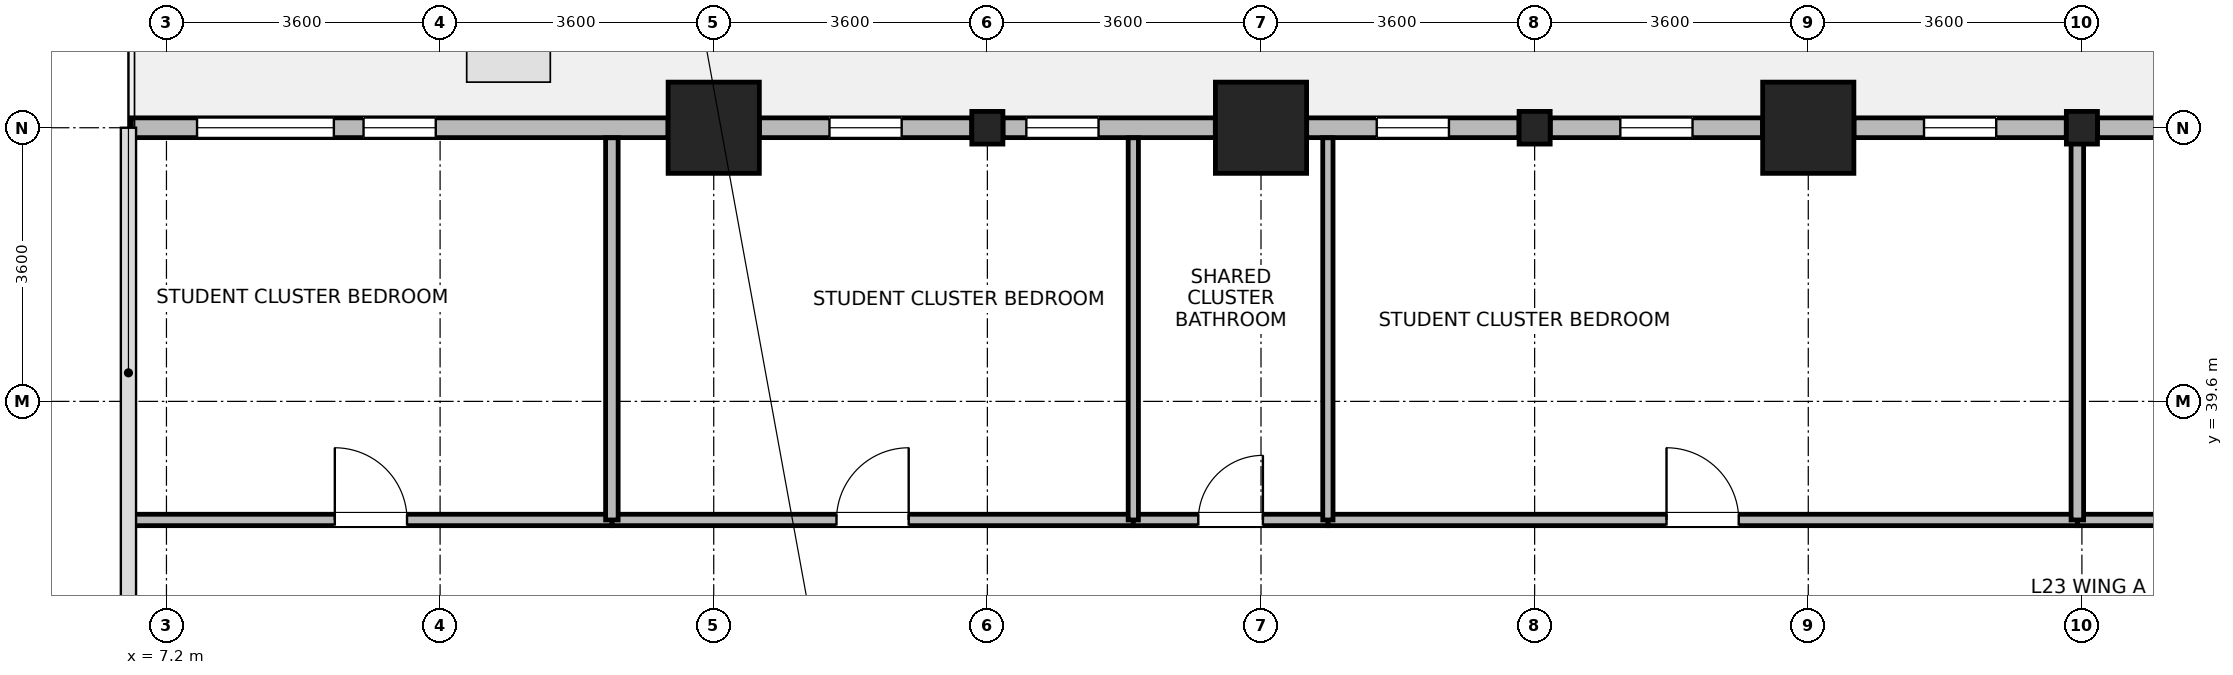
"""IFC4 building model, lengths in metres.
Left out: names, types, materials, properties, quantities, classifications, styles, units other than length and angle.
Written with IfcOpenShell. Run it as: python <this file> out.ifc"""

import sys

from ifc_helpers import new_model, si_unit, direction, frame, frame_2d, origin, origin_2d, place, context, subcontext, project, spatial, rectangle, i_section, extrude, source, transform, mapped, element, fill, save


model = new_model("IFC4")
c1 = context("Model", 3, precision=1e-05, world=origin(), true_north=direction((0.0, 1.0)))
c2 = subcontext(c1, "Body", "Model", "MODEL_VIEW")
j1 = project(units=[si_unit("LENGTHUNIT", "METRE"), si_unit("PLANEANGLEUNIT", "RADIAN")], contexts=[c1])
p1 = place(None, origin())
s1 = spatial("IfcSite", under=j1, at=p1, CompositionType="ELEMENT")
p2 = place(p1, origin())
s2 = spatial("IfcBuilding", under=s1, at=p2, CompositionType="ELEMENT")
p3 = place(p2, frame((0.0, 0.0, 93.4)))
s3 = spatial("IfcBuildingStorey", under=s2, at=p3, CompositionType="ELEMENT", Elevation=93.4)
m1 = source(origin(), c2, "Body", "SweptSolid", [
    extrude(rectangle(XDim=1.2, YDim=1.2, at=origin_2d()), origin(), (0.0, 0.0, 1.0), 3.7),
])
for number, where, z_axis, x_axis in (
    (1, (14.4, 43.2, 0.0), (0.0, 0.0, 1.0), (1.0, 0.0, 0.0)),
    (2, (21.6, 43.2, 0.0), (0.0, 0.0, 1.0), (1.0, 0.0, 0.0)),
    (3, (28.8, 43.2, 0.0), (0.0, 0.0, 1.0), (1.0, 0.0, 0.0)),
):
    element("IfcColumn", number, at=place(p3, frame(where, z_axis=z_axis, x_axis=x_axis)), inside=s3, PredefinedType="COLUMN", context=c2, shape_type="MappedRepresentation", body=[
        mapped(m1, transform((0.0, 0.0, 0.0), x_axis=(1.0, 0.0, 0.0), y_axis=(0.0, 1.0, 0.0), z_axis=(0.0, 0.0, 1.0), scale=1.0)),
    ])
m2 = source(origin(), c2, "Body", "SweptSolid", [
    extrude(i_section(OverallWidth=0.409, OverallDepth=0.43, WebThickness=0.024, FlangeThickness=0.033, FilletRadius=0.015, at=origin_2d()), origin(), (0.0, 0.0, 1.0), 3.7),
])
for number, where, z_axis, x_axis in (
    (4, (18.0, 43.2, 0.0), (0.0, 0.0, 1.0), (1.0, 0.0, 0.0)),
    (5, (25.2, 43.2, 0.0), (0.0, 0.0, 1.0), (1.0, 0.0, 0.0)),
    (6, (32.4, 43.2, 0.0), (0.0, 0.0, 1.0), (1.0, 0.0, 0.0)),
):
    element("IfcColumn", number, at=place(p3, frame(where, z_axis=z_axis, x_axis=x_axis)), inside=s3, PredefinedType="COLUMN", context=c2, shape_type="MappedRepresentation", body=[
        mapped(m2, transform((0.0, 0.0, 0.0), x_axis=(1.0, 0.0, 0.0), y_axis=(0.0, 1.0, 0.0), z_axis=(0.0, 0.0, 1.0), scale=1.0)),
    ])
p4 = place(p3, frame((32.605, 43.2, 0.0), z_axis=(0.0, 0.0, 1.0), x_axis=(1.0, 0.0, 0.0)))
e7 = element("IfcWall", 7, at=p4, inside=s3, PredefinedType="STANDARD", context=c2, shape_type="SweptSolid", body=[
    extrude(rectangle(XDim=2.793, YDim=0.26, at=frame_2d((1.397, 0.0))), origin(), (0.0, 0.0, 1.0), 2.93),
])
p5 = place(p4, frame((0.922, 0.0, 0.85)))
e8 = element("IfcOpeningElement", 8, at=p5, cuts=e7, PredefinedType="OPENING", context=c2, shape_type="SweptSolid", body=[
    extrude(rectangle(XDim=0.95, YDim=1.75, at=frame_2d((0.475, 0.875))), frame((0.0, 0.14, 0.0), z_axis=(0.0, -1.0, 0.0), x_axis=(1.0, 0.0, 0.0)), (0.0, 0.0, 1.0), 0.28),
])
p6 = place(p3, frame((29.401, 43.2, 0.0), z_axis=(0.0, 0.0, 1.0), x_axis=(1.0, 0.0, 0.0)))
e9 = element("IfcWall", 9, at=p6, inside=s3, PredefinedType="STANDARD", context=c2, shape_type="SweptSolid", body=[
    extrude(rectangle(XDim=2.794, YDim=0.26, at=frame_2d((1.397, 0.0))), origin(), (0.0, 0.0, 1.0), 2.93),
])
p7 = place(p6, frame((0.922, 0.0, 0.85)))
e10 = element("IfcOpeningElement", 10, at=p7, cuts=e9, PredefinedType="OPENING", context=c2, shape_type="SweptSolid", body=[
    extrude(rectangle(XDim=0.95, YDim=1.75, at=frame_2d((0.475, 0.875))), frame((0.0, 0.14, 0.0), z_axis=(0.0, -1.0, 0.0), x_axis=(1.0, 0.0, 0.0)), (0.0, 0.0, 1.0), 0.28),
])
p8 = place(p3, frame((25.406, 43.2, 0.0), z_axis=(0.0, 0.0, 1.0), x_axis=(1.0, 0.0, 0.0)))
e11 = element("IfcWall", 11, at=p8, inside=s3, PredefinedType="STANDARD", context=c2, shape_type="SweptSolid", body=[
    extrude(rectangle(XDim=2.793, YDim=0.26, at=frame_2d((1.397, 0.0))), origin(), (0.0, 0.0, 1.0), 2.93),
])
p9 = place(p8, frame((0.922, 0.0, 0.85)))
e12 = element("IfcOpeningElement", 12, at=p9, cuts=e11, PredefinedType="OPENING", context=c2, shape_type="SweptSolid", body=[
    extrude(rectangle(XDim=0.95, YDim=1.75, at=frame_2d((0.475, 0.875))), frame((0.0, 0.14, 0.0), z_axis=(0.0, -1.0, 0.0), x_axis=(1.0, 0.0, 0.0)), (0.0, 0.0, 1.0), 0.28),
])
p10 = place(p3, frame((22.201, 43.2, 0.0), z_axis=(0.0, 0.0, 1.0), x_axis=(1.0, 0.0, 0.0)))
e13 = element("IfcWall", 13, at=p10, inside=s3, PredefinedType="STANDARD", context=c2, shape_type="SweptSolid", body=[
    extrude(rectangle(XDim=2.793, YDim=0.26, at=frame_2d((1.397, 0.0))), origin(), (0.0, 0.0, 1.0), 2.93),
])
p11 = place(p10, frame((0.922, 0.0, 0.85)))
e14 = element("IfcOpeningElement", 14, at=p11, cuts=e13, PredefinedType="OPENING", context=c2, shape_type="SweptSolid", body=[
    extrude(rectangle(XDim=0.95, YDim=1.75, at=frame_2d((0.475, 0.875))), frame((0.0, 0.14, 0.0), z_axis=(0.0, -1.0, 0.0), x_axis=(1.0, 0.0, 0.0)), (0.0, 0.0, 1.0), 0.28),
])
p12 = place(p3, frame((18.206, 43.2, 0.0), z_axis=(0.0, 0.0, 1.0), x_axis=(1.0, 0.0, 0.0)))
e15 = element("IfcWall", 15, at=p12, inside=s3, PredefinedType="STANDARD", context=c2, shape_type="SweptSolid", body=[
    extrude(rectangle(XDim=2.793, YDim=0.26, at=frame_2d((1.397, 0.0))), origin(), (0.0, 0.0, 1.0), 2.93),
])
p13 = place(p12, frame((0.307, 0.0, 0.85)))
e16 = element("IfcOpeningElement", 16, at=p13, cuts=e15, PredefinedType="OPENING", context=c2, shape_type="SweptSolid", body=[
    extrude(rectangle(XDim=0.95, YDim=1.75, at=frame_2d((0.475, 0.875))), frame((0.0, 0.14, 0.0), z_axis=(0.0, -1.0, 0.0), x_axis=(1.0, 0.0, 0.0)), (0.0, 0.0, 1.0), 0.28),
])
p14 = place(p3, frame((15.001, 43.2, 0.0), z_axis=(0.0, 0.0, 1.0), x_axis=(1.0, 0.0, 0.0)))
e17 = element("IfcWall", 17, at=p14, inside=s3, PredefinedType="STANDARD", context=c2, shape_type="SweptSolid", body=[
    extrude(rectangle(XDim=2.793, YDim=0.26, at=frame_2d((1.397, 0.0))), origin(), (0.0, 0.0, 1.0), 2.93),
])
p15 = place(p14, frame((0.922, 0.0, 0.85)))
e18 = element("IfcOpeningElement", 18, at=p15, cuts=e17, PredefinedType="OPENING", context=c2, shape_type="SweptSolid", body=[
    extrude(rectangle(XDim=0.95, YDim=1.75, at=frame_2d((0.475, 0.875))), frame((0.0, 0.14, 0.0), z_axis=(0.0, -1.0, 0.0), x_axis=(1.0, 0.0, 0.0)), (0.0, 0.0, 1.0), 0.28),
])
p16 = place(p3, frame((6.737, 43.2, 0.0), z_axis=(0.0, 0.0, 1.0), x_axis=(1.0, 0.0, 0.0)))
e19 = element("IfcWall", 19, at=p16, inside=s3, PredefinedType="STANDARD", context=c2, shape_type="SweptSolid", body=[
    extrude(rectangle(XDim=7.062, YDim=0.26, at=frame_2d((3.531, 0.0))), origin(), (0.0, 0.0, 1.0), 3.43),
])
p17 = place(p16, frame((0.865, 0.0, 0.85)))
e20 = element("IfcOpeningElement", 20, at=p17, cuts=e19, PredefinedType="OPENING", context=c2, shape_type="SweptSolid", body=[
    extrude(rectangle(XDim=1.8, YDim=1.85, at=frame_2d((0.9, 0.925))), frame((0.0, 0.14, 0.0), z_axis=(0.0, -1.0, 0.0), x_axis=(1.0, 0.0, 0.0)), (0.0, 0.0, 1.0), 0.28),
])
p18 = place(p16, frame((3.056, 0.0, 0.85)))
e21 = element("IfcOpeningElement", 21, at=p18, cuts=e19, PredefinedType="OPENING", context=c2, shape_type="SweptSolid", body=[
    extrude(rectangle(XDim=0.95, YDim=1.75, at=frame_2d((0.475, 0.875))), frame((0.0, 0.14, 0.0), z_axis=(0.0, -1.0, 0.0), x_axis=(1.0, 0.0, 0.0)), (0.0, 0.0, 1.0), 0.28),
])
p19 = place(p3, frame((32.34, 38.04, 0.0), z_axis=(0.0, 0.0, 1.0), x_axis=(1.0, 0.0, 0.0)))
e22 = element("IfcWall", 22, at=p19, inside=s3, PredefinedType="PARTITIONING", context=c2, shape_type="SweptSolid", body=[
    extrude(rectangle(XDim=14.4, YDim=0.15, at=frame_2d((7.2, 0.0))), origin(), (0.0, 0.0, 1.0), 3.43),
])
p20 = place(p19, frame((6.75, 0.0, 0.0)))
e23 = element("IfcOpeningElement", 23, at=p20, cuts=e22, PredefinedType="OPENING", context=c2, shape_type="SweptSolid", body=[
    extrude(rectangle(XDim=0.9, YDim=2.08, at=frame_2d((0.45, 1.04))), frame((0.0, 0.085, 0.0), z_axis=(0.0, -1.0, 0.0), x_axis=(1.0, 0.0, 0.0)), (0.0, 0.0, 1.0), 0.17),
])
p21 = place(p3, frame((22.48, 38.04, 0.0), z_axis=(0.0, 0.0, 1.0), x_axis=(1.0, 0.0, 0.0)))
e24 = element("IfcWall", 24, at=p21, inside=s3, PredefinedType="PARTITIONING", context=c2, shape_type="SweptSolid", body=[
    extrude(rectangle(XDim=9.86, YDim=0.15, at=frame_2d((4.93, 0.0))), origin(), (0.0, 0.0, 1.0), 3.43),
])
p22 = place(p21, frame((4.455, 0.0, 0.0)))
e25 = element("IfcOpeningElement", 25, at=p22, cuts=e24, PredefinedType="OPENING", context=c2, shape_type="SweptSolid", body=[
    extrude(rectangle(XDim=0.95, YDim=2.1, at=frame_2d((0.475, 1.05))), frame((0.0, 0.085, 0.0), z_axis=(0.0, -1.0, 0.0), x_axis=(1.0, 0.0, 0.0)), (0.0, 0.0, 1.0), 0.17),
])
p23 = place(p3, frame((13.06, 38.04, 0.0), z_axis=(0.0, 0.0, 1.0), x_axis=(1.0, 0.0, 0.0)))
e26 = element("IfcWall", 26, at=p23, inside=s3, PredefinedType="PARTITIONING", context=c2, shape_type="SweptSolid", body=[
    extrude(rectangle(XDim=6.86, YDim=0.15, at=frame_2d((3.43, 0.0))), origin(), (0.0, 0.0, 1.0), 3.43),
])
p24 = place(p23, frame((2.955, 0.0, 0.0)))
e27 = element("IfcOpeningElement", 27, at=p24, cuts=e26, PredefinedType="OPENING", context=c2, shape_type="SweptSolid", body=[
    extrude(rectangle(XDim=0.95, YDim=2.1, at=frame_2d((0.475, 1.05))), frame((0.0, 0.085, 0.0), z_axis=(0.0, -1.0, 0.0), x_axis=(1.0, 0.0, 0.0)), (0.0, 0.0, 1.0), 0.17),
])
p25 = place(p3, frame((6.72, 38.04, 0.0), z_axis=(0.0, 0.0, 1.0), x_axis=(1.0, 0.0, 0.0)))
e28 = element("IfcWall", 28, at=p25, inside=s3, PredefinedType="PARTITIONING", context=c2, shape_type="SweptSolid", body=[
    extrude(rectangle(XDim=6.34, YDim=0.15, at=frame_2d((3.17, 0.0))), origin(), (0.0, 0.0, 1.0), 3.43),
])
p26 = place(p25, frame((2.695, 0.0, 0.0)))
e29 = element("IfcOpeningElement", 29, at=p26, cuts=e28, PredefinedType="OPENING", context=c2, shape_type="SweptSolid", body=[
    extrude(rectangle(XDim=0.95, YDim=2.1, at=frame_2d((0.475, 1.05))), frame((0.0, 0.085, 0.0), z_axis=(0.0, -1.0, 0.0), x_axis=(1.0, 0.0, 0.0)), (0.0, 0.0, 1.0), 0.17),
])
p27 = place(p3, frame((19.92, 38.04, 0.0), z_axis=(0.0, 0.0, 1.0), x_axis=(1.0, 0.0, 0.0)))
e30 = element("IfcWall", 30, at=p27, inside=s3, PredefinedType="PARTITIONING", context=c2, shape_type="SweptSolid", body=[
    extrude(rectangle(XDim=2.56, YDim=0.15, at=frame_2d((1.28, 0.0))), origin(), (0.0, 0.0, 1.0), 3.43),
])
p28 = place(p27, frame((0.855, 0.0, 0.0)))
e31 = element("IfcOpeningElement", 31, at=p28, cuts=e30, PredefinedType="OPENING", context=c2, shape_type="SweptSolid", body=[
    extrude(rectangle(XDim=0.85, YDim=2.04, at=frame_2d((0.425, 1.02))), frame((0.0, 0.085, 0.0), z_axis=(0.0, -1.0, 0.0), x_axis=(1.0, 0.0, 0.0)), (0.0, 0.0, 1.0), 0.17),
])
p29 = place(p3, frame((13.06, 38.04, 0.0), z_axis=(0.0, 0.0, 1.0), x_axis=(0.0, 1.0, 0.0)))
e32 = element("IfcWall", 32, at=p29, inside=s3, PredefinedType="PARTITIONING", context=c2, shape_type="SweptSolid", body=[
    extrude(rectangle(XDim=5.028, YDim=0.165, at=frame_2d((2.514, 0.0))), origin(), (0.0, 0.0, 1.0), 3.43),
])
for number, where, z_axis, x_axis in (
    (33, (19.92, 38.04, 0.0), (0.0, 0.0, 1.0), (0.0, 1.0, 0.0)),
    (34, (22.48, 38.04, 0.0), (0.0, 0.0, 1.0), (0.0, 1.0, 0.0)),
):
    element("IfcWall", number, at=place(p3, frame(where, z_axis=z_axis, x_axis=x_axis)), inside=s3, PredefinedType="PARTITIONING", context=c2, shape_type="SweptSolid", body=[
        extrude(rectangle(XDim=5.028, YDim=0.135, at=frame_2d((2.514, 0.0))), origin(), (0.0, 0.0, 1.0), 3.43),
    ])
p30 = place(p3, frame((32.34, 38.04, 0.0), z_axis=(0.0, 0.0, 1.0), x_axis=(0.0, 1.0, 0.0)))
e35 = element("IfcWall", 35, at=p30, inside=s3, PredefinedType="PARTITIONING", context=c2, shape_type="SweptSolid", body=[
    extrude(rectangle(XDim=5.028, YDim=0.165, at=frame_2d((2.514, 0.0))), origin(), (0.0, 0.0, 1.0), 3.07),
])
p31 = place(p7, origin())
e36 = element("IfcWindow", 36, at=p31, inside=s3, PartitioningType="SINGLE_PANEL", PredefinedType="WINDOW", context=c2, shape_type="SweptSolid", body=[
    extrude(rectangle(XDim=0.95, YDim=1.75, at=frame_2d((0.475, 0.875))), frame((0.0, 0.03, 0.0), z_axis=(0.0, -1.0, 0.0), x_axis=(1.0, 0.0, 0.0)), (0.0, 0.0, 1.0), 0.06),
])
fill(e10, e36)
p32 = place(p9, origin())
e37 = element("IfcWindow", 37, at=p32, inside=s3, PartitioningType="SINGLE_PANEL", PredefinedType="WINDOW", context=c2, shape_type="SweptSolid", body=[
    extrude(rectangle(XDim=0.95, YDim=1.75, at=frame_2d((0.475, 0.875))), frame((0.0, 0.03, 0.0), z_axis=(0.0, -1.0, 0.0), x_axis=(1.0, 0.0, 0.0)), (0.0, 0.0, 1.0), 0.06),
])
fill(e12, e37)
p33 = place(p11, origin())
e38 = element("IfcWindow", 38, at=p33, inside=s3, PartitioningType="SINGLE_PANEL", PredefinedType="WINDOW", context=c2, shape_type="SweptSolid", body=[
    extrude(rectangle(XDim=0.95, YDim=1.75, at=frame_2d((0.475, 0.875))), frame((0.0, 0.03, 0.0), z_axis=(0.0, -1.0, 0.0), x_axis=(1.0, 0.0, 0.0)), (0.0, 0.0, 1.0), 0.06),
])
fill(e14, e38)
p34 = place(p13, origin())
e39 = element("IfcWindow", 39, at=p34, inside=s3, PartitioningType="SINGLE_PANEL", PredefinedType="WINDOW", context=c2, shape_type="SweptSolid", body=[
    extrude(rectangle(XDim=0.95, YDim=1.75, at=frame_2d((0.475, 0.875))), frame((0.0, 0.03, 0.0), z_axis=(0.0, -1.0, 0.0), x_axis=(1.0, 0.0, 0.0)), (0.0, 0.0, 1.0), 0.06),
])
fill(e16, e39)
p35 = place(p15, origin())
e40 = element("IfcWindow", 40, at=p35, inside=s3, PartitioningType="SINGLE_PANEL", PredefinedType="WINDOW", context=c2, shape_type="SweptSolid", body=[
    extrude(rectangle(XDim=0.95, YDim=1.75, at=frame_2d((0.475, 0.875))), frame((0.0, 0.03, 0.0), z_axis=(0.0, -1.0, 0.0), x_axis=(1.0, 0.0, 0.0)), (0.0, 0.0, 1.0), 0.06),
])
fill(e18, e40)
p36 = place(p17, origin())
e41 = element("IfcWindow", 41, at=p36, inside=s3, PartitioningType="SINGLE_PANEL", PredefinedType="WINDOW", context=c2, shape_type="SweptSolid", body=[
    extrude(rectangle(XDim=1.8, YDim=1.85, at=frame_2d((0.9, 0.925))), frame((0.0, 0.03, 0.0), z_axis=(0.0, -1.0, 0.0), x_axis=(1.0, 0.0, 0.0)), (0.0, 0.0, 1.0), 0.06),
])
fill(e20, e41)
p37 = place(p18, origin())
e42 = element("IfcWindow", 42, at=p37, inside=s3, PartitioningType="SINGLE_PANEL", PredefinedType="WINDOW", context=c2, shape_type="SweptSolid", body=[
    extrude(rectangle(XDim=0.95, YDim=1.75, at=frame_2d((0.475, 0.875))), frame((0.0, 0.03, 0.0), z_axis=(0.0, -1.0, 0.0), x_axis=(1.0, 0.0, 0.0)), (0.0, 0.0, 1.0), 0.06),
])
fill(e21, e42)
p38 = place(p22, origin())
e43 = element("IfcDoor", 43, at=p38, inside=s3, OperationType="SINGLE_SWING_LEFT", PredefinedType="DOOR", context=c2, shape_type="SweptSolid", body=[
    extrude(rectangle(XDim=0.95, YDim=2.1, at=frame_2d((0.475, 1.05))), frame((0.0, 0.025, 0.0), z_axis=(0.0, -1.0, 0.0), x_axis=(1.0, 0.0, 0.0)), (0.0, 0.0, 1.0), 0.05),
])
fill(e25, e43)
p39 = place(p24, origin())
e44 = element("IfcDoor", 44, at=p39, inside=s3, OperationType="SINGLE_SWING_RIGHT", PredefinedType="DOOR", context=c2, shape_type="SweptSolid", body=[
    extrude(rectangle(XDim=0.95, YDim=2.1, at=frame_2d((0.475, 1.05))), frame((0.0, 0.025, 0.0), z_axis=(0.0, -1.0, 0.0), x_axis=(1.0, 0.0, 0.0)), (0.0, 0.0, 1.0), 0.05),
])
fill(e27, e44)
p40 = place(p26, origin())
e45 = element("IfcDoor", 45, at=p40, inside=s3, OperationType="SINGLE_SWING_LEFT", PredefinedType="DOOR", context=c2, shape_type="SweptSolid", body=[
    extrude(rectangle(XDim=0.95, YDim=2.1, at=frame_2d((0.475, 1.05))), frame((0.0, 0.025, 0.0), z_axis=(0.0, -1.0, 0.0), x_axis=(1.0, 0.0, 0.0)), (0.0, 0.0, 1.0), 0.05),
])
fill(e29, e45)
p41 = place(p28, origin())
e46 = element("IfcDoor", 46, at=p41, inside=s3, OperationType="SINGLE_SWING_RIGHT", PredefinedType="DOOR", context=c2, shape_type="SweptSolid", body=[
    extrude(rectangle(XDim=0.85, YDim=2.04, at=frame_2d((0.425, 1.02))), frame((0.0, 0.025, 0.0), z_axis=(0.0, -1.0, 0.0), x_axis=(1.0, 0.0, 0.0)), (0.0, 0.0, 1.0), 0.05),
])
fill(e31, e46)
save(model, sys.argv[1])
